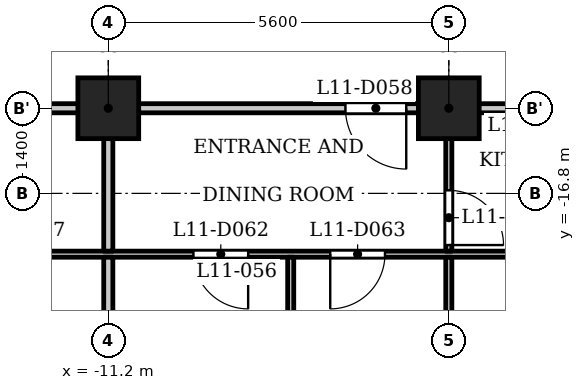
"""IFC4 building model, lengths in metres.
Left out: names, types, materials, properties, quantities, classifications, styles, units other than length and angle.
Written with IfcOpenShell. Run it as: python <this file> out.ifc"""

import sys

from ifc_helpers import new_model, si_unit, direction, frame, frame_2d, origin, origin_2d, place, context, subcontext, project, spatial, rectangle, extrude, element, fill, save


model = new_model("IFC4")
c1 = context("Model", 3, precision=1e-05, world=origin(), true_north=direction((0.0, 1.0)))
c2 = subcontext(c1, "Body", "Model", "MODEL_VIEW")
j1 = project(units=[si_unit("LENGTHUNIT", "METRE"), si_unit("PLANEANGLEUNIT", "RADIAN")], contexts=[c1])
p1 = place(None, origin())
s1 = spatial("IfcSite", under=j1, at=p1, CompositionType="ELEMENT")
p2 = place(p1, origin())
s2 = spatial("IfcBuilding", under=s1, at=p2, CompositionType="ELEMENT")
p3 = place(p2, frame((0.0, 0.0, 48.0)))
s3 = spatial("IfcBuildingStorey", under=s2, at=p3, CompositionType="ELEMENT", Elevation=48.0)
for number, where, z_axis, x_axis in (
    (1, (-11.2, -15.4, 0.0), (0.0, 0.0, 1.0), (1.0, 0.0, 0.0)),
    (2, (-5.6, -15.4, 0.0), (0.0, 0.0, 1.0), (1.0, 0.0, 0.0)),
):
    element("IfcColumn", number, at=place(p3, frame(where, z_axis=z_axis, x_axis=x_axis)), inside=s3, PredefinedType="COLUMN", context=c2, shape_type="SweptSolid", body=[
        extrude(rectangle(XDim=1.0, YDim=1.0, at=origin_2d()), origin(), (0.0, 0.0, 1.0), 3.5),
    ])
p4 = place(p3, frame((-26.394, -17.8, 0.0), z_axis=(0.0, 0.0, 1.0), x_axis=(1.0, 0.0, 0.0)))
e3 = element("IfcWall", 3, at=p4, inside=s3, PredefinedType="PARTITIONING", context=c2, shape_type="SweptSolid", body=[
    extrude(rectangle(XDim=53.126, YDim=0.1, at=frame_2d((26.563, 0.0))), origin(), (0.0, 0.0, 1.0), 3.2),
])
p5 = place(p4, frame((0.794, 0.0, 0.0)))
e4 = element("IfcOpeningElement", 4, at=p5, cuts=e3, PredefinedType="OPENING", context=c2, shape_type="SweptSolid", body=[
    extrude(rectangle(XDim=0.8, YDim=2.1, at=frame_2d((0.4, 1.05))), frame((0.0, 0.06, 0.0), z_axis=(0.0, -1.0, 0.0), x_axis=(1.0, 0.0, 0.0)), (0.0, 0.0, 1.0), 0.12),
])
p6 = place(p4, frame((5.644, 0.0, 0.0)))
e5 = element("IfcOpeningElement", 5, at=p6, cuts=e3, PredefinedType="OPENING", context=c2, shape_type="SweptSolid", body=[
    extrude(rectangle(XDim=0.9, YDim=2.1, at=frame_2d((0.45, 1.05))), frame((0.0, 0.06, 0.0), z_axis=(0.0, -1.0, 0.0), x_axis=(1.0, 0.0, 0.0)), (0.0, 0.0, 1.0), 0.12),
])
p7 = place(p4, frame((10.394, 0.0, 0.0)))
e6 = element("IfcOpeningElement", 6, at=p7, cuts=e3, PredefinedType="OPENING", context=c2, shape_type="SweptSolid", body=[
    extrude(rectangle(XDim=0.8, YDim=2.1, at=frame_2d((0.4, 1.05))), frame((0.0, 0.06, 0.0), z_axis=(0.0, -1.0, 0.0), x_axis=(1.0, 0.0, 0.0)), (0.0, 0.0, 1.0), 0.12),
])
p8 = place(p4, frame((13.244, 0.0, 0.0)))
e7 = element("IfcOpeningElement", 7, at=p8, cuts=e3, PredefinedType="OPENING", context=c2, shape_type="SweptSolid", body=[
    extrude(rectangle(XDim=0.9, YDim=2.1, at=frame_2d((0.45, 1.05))), frame((0.0, 0.06, 0.0), z_axis=(0.0, -1.0, 0.0), x_axis=(1.0, 0.0, 0.0)), (0.0, 0.0, 1.0), 0.12),
])
p9 = place(p4, frame((23.944, 0.0, 0.0)))
e8 = element("IfcOpeningElement", 8, at=p9, cuts=e3, PredefinedType="OPENING", context=c2, shape_type="SweptSolid", body=[
    extrude(rectangle(XDim=0.8, YDim=2.1, at=frame_2d((0.4, 1.05))), frame((0.0, 0.06, 0.0), z_axis=(0.0, -1.0, 0.0), x_axis=(1.0, 0.0, 0.0)), (0.0, 0.0, 1.0), 0.12),
])
p10 = place(p4, frame((22.194, 0.0, 0.0)))
e9 = element("IfcOpeningElement", 9, at=p10, cuts=e3, PredefinedType="OPENING", context=c2, shape_type="SweptSolid", body=[
    extrude(rectangle(XDim=0.9, YDim=2.1, at=frame_2d((0.45, 1.05))), frame((0.0, 0.06, 0.0), z_axis=(0.0, -1.0, 0.0), x_axis=(1.0, 0.0, 0.0)), (0.0, 0.0, 1.0), 0.12),
])
p11 = place(p4, frame((16.594, 0.0, 0.0)))
e10 = element("IfcOpeningElement", 10, at=p11, cuts=e3, PredefinedType="OPENING", context=c2, shape_type="SweptSolid", body=[
    extrude(rectangle(XDim=0.9, YDim=2.1, at=frame_2d((0.45, 1.05))), frame((0.0, 0.06, 0.0), z_axis=(0.0, -1.0, 0.0), x_axis=(1.0, 0.0, 0.0)), (0.0, 0.0, 1.0), 0.12),
])
p12 = place(p4, frame((18.844, 0.0, 0.0)))
e11 = element("IfcOpeningElement", 11, at=p12, cuts=e3, PredefinedType="OPENING", context=c2, shape_type="SweptSolid", body=[
    extrude(rectangle(XDim=0.9, YDim=2.1, at=frame_2d((0.45, 1.05))), frame((0.0, 0.06, 0.0), z_axis=(0.0, -1.0, 0.0), x_axis=(1.0, 0.0, 0.0)), (0.0, 0.0, 1.0), 0.12),
])
p13 = place(p4, frame((30.544, 0.0, 0.0)))
e12 = element("IfcOpeningElement", 12, at=p13, cuts=e3, PredefinedType="OPENING", context=c2, shape_type="SweptSolid", body=[
    extrude(rectangle(XDim=0.8, YDim=2.1, at=frame_2d((0.4, 1.05))), frame((0.0, 0.06, 0.0), z_axis=(0.0, -1.0, 0.0), x_axis=(1.0, 0.0, 0.0)), (0.0, 0.0, 1.0), 0.12),
])
p14 = place(p4, frame((27.294, 0.0, 0.0)))
e13 = element("IfcOpeningElement", 13, at=p14, cuts=e3, PredefinedType="OPENING", context=c2, shape_type="SweptSolid", body=[
    extrude(rectangle(XDim=0.9, YDim=2.1, at=frame_2d((0.45, 1.05))), frame((0.0, 0.06, 0.0), z_axis=(0.0, -1.0, 0.0), x_axis=(1.0, 0.0, 0.0)), (0.0, 0.0, 1.0), 0.12),
])
p15 = place(p4, frame((35.894, 0.0, 0.0)))
e14 = element("IfcOpeningElement", 14, at=p15, cuts=e3, PredefinedType="OPENING", context=c2, shape_type="SweptSolid", body=[
    extrude(rectangle(XDim=0.8, YDim=2.1, at=frame_2d((0.4, 1.05))), frame((0.0, 0.06, 0.0), z_axis=(0.0, -1.0, 0.0), x_axis=(1.0, 0.0, 0.0)), (0.0, 0.0, 1.0), 0.12),
])
p16 = place(p4, frame((33.644, 0.0, 0.0)))
e15 = element("IfcOpeningElement", 15, at=p16, cuts=e3, PredefinedType="OPENING", context=c2, shape_type="SweptSolid", body=[
    extrude(rectangle(XDim=0.9, YDim=2.1, at=frame_2d((0.45, 1.05))), frame((0.0, 0.06, 0.0), z_axis=(0.0, -1.0, 0.0), x_axis=(1.0, 0.0, 0.0)), (0.0, 0.0, 1.0), 0.12),
])
p17 = place(p4, frame((41.494, 0.0, 0.0)))
e16 = element("IfcOpeningElement", 16, at=p17, cuts=e3, PredefinedType="OPENING", context=c2, shape_type="SweptSolid", body=[
    extrude(rectangle(XDim=0.8, YDim=2.1, at=frame_2d((0.4, 1.05))), frame((0.0, 0.06, 0.0), z_axis=(0.0, -1.0, 0.0), x_axis=(1.0, 0.0, 0.0)), (0.0, 0.0, 1.0), 0.12),
])
p18 = place(p4, frame((38.744, 0.0, 0.0)))
e17 = element("IfcOpeningElement", 17, at=p18, cuts=e3, PredefinedType="OPENING", context=c2, shape_type="SweptSolid", body=[
    extrude(rectangle(XDim=0.9, YDim=2.1, at=frame_2d((0.45, 1.05))), frame((0.0, 0.06, 0.0), z_axis=(0.0, -1.0, 0.0), x_axis=(1.0, 0.0, 0.0)), (0.0, 0.0, 1.0), 0.12),
])
p19 = place(p4, frame((49.362, 0.0, 0.0)))
e18 = element("IfcOpeningElement", 18, at=p19, cuts=e3, PredefinedType="OPENING", context=c2, shape_type="SweptSolid", body=[
    extrude(rectangle(XDim=0.8, YDim=2.1, at=frame_2d((0.4, 1.05))), frame((0.0, 0.06, 0.0), z_axis=(0.0, -1.0, 0.0), x_axis=(1.0, 0.0, 0.0)), (0.0, 0.0, 1.0), 0.12),
])
p20 = place(p4, frame((45.094, 0.0, 0.0)))
e19 = element("IfcOpeningElement", 19, at=p20, cuts=e3, PredefinedType="OPENING", context=c2, shape_type="SweptSolid", body=[
    extrude(rectangle(XDim=0.9, YDim=2.1, at=frame_2d((0.45, 1.05))), frame((0.0, 0.06, 0.0), z_axis=(0.0, -1.0, 0.0), x_axis=(1.0, 0.0, 0.0)), (0.0, 0.0, 1.0), 0.12),
])
p21 = place(p3, frame((-27.484, -15.4, 0.0), z_axis=(0.0, 0.0, 1.0), x_axis=(1.0, 0.0, 0.0)))
e20 = element("IfcWall", 20, at=p21, inside=s3, PredefinedType="PARTITIONING", context=c2, shape_type="SweptSolid", body=[
    extrude(rectangle(XDim=54.968, YDim=0.15, at=frame_2d((27.484, 0.0))), origin(), (0.0, 0.0, 1.0), 3.2),
])
p22 = place(p21, frame((5.734, 0.0, 0.0)))
e21 = element("IfcOpeningElement", 21, at=p22, cuts=e20, PredefinedType="OPENING", context=c2, shape_type="SweptSolid", body=[
    extrude(rectangle(XDim=1.0, YDim=2.1, at=frame_2d((0.5, 1.05))), frame((0.0, 0.085, 0.0), z_axis=(0.0, -1.0, 0.0), x_axis=(1.0, 0.0, 0.0)), (0.0, 0.0, 1.0), 0.17),
])
p23 = place(p21, frame((13.334, 0.0, 0.0)))
e22 = element("IfcOpeningElement", 22, at=p23, cuts=e20, PredefinedType="OPENING", context=c2, shape_type="SweptSolid", body=[
    extrude(rectangle(XDim=1.0, YDim=2.1, at=frame_2d((0.5, 1.05))), frame((0.0, 0.085, 0.0), z_axis=(0.0, -1.0, 0.0), x_axis=(1.0, 0.0, 0.0)), (0.0, 0.0, 1.0), 0.17),
])
p24 = place(p21, frame((20.184, 0.0, 0.0)))
e23 = element("IfcOpeningElement", 23, at=p24, cuts=e20, PredefinedType="OPENING", context=c2, shape_type="SweptSolid", body=[
    extrude(rectangle(XDim=1.0, YDim=2.1, at=frame_2d((0.5, 1.05))), frame((0.0, 0.085, 0.0), z_axis=(0.0, -1.0, 0.0), x_axis=(1.0, 0.0, 0.0)), (0.0, 0.0, 1.0), 0.17),
])
p25 = place(p21, frame((29.384, 0.0, 0.0)))
e24 = element("IfcOpeningElement", 24, at=p25, cuts=e20, PredefinedType="OPENING", context=c2, shape_type="SweptSolid", body=[
    extrude(rectangle(XDim=1.0, YDim=2.1, at=frame_2d((0.5, 1.05))), frame((0.0, 0.085, 0.0), z_axis=(0.0, -1.0, 0.0), x_axis=(1.0, 0.0, 0.0)), (0.0, 0.0, 1.0), 0.17),
])
p26 = place(p21, frame((33.734, 0.0, 0.0)))
e25 = element("IfcOpeningElement", 25, at=p26, cuts=e20, PredefinedType="OPENING", context=c2, shape_type="SweptSolid", body=[
    extrude(rectangle(XDim=1.0, YDim=2.1, at=frame_2d((0.5, 1.05))), frame((0.0, 0.085, 0.0), z_axis=(0.0, -1.0, 0.0), x_axis=(1.0, 0.0, 0.0)), (0.0, 0.0, 1.0), 0.17),
])
p27 = place(p21, frame((39.584, 0.0, 0.0)))
e26 = element("IfcOpeningElement", 26, at=p27, cuts=e20, PredefinedType="OPENING", context=c2, shape_type="SweptSolid", body=[
    extrude(rectangle(XDim=1.0, YDim=2.1, at=frame_2d((0.5, 1.05))), frame((0.0, 0.085, 0.0), z_axis=(0.0, -1.0, 0.0), x_axis=(1.0, 0.0, 0.0)), (0.0, 0.0, 1.0), 0.17),
])
p28 = place(p21, frame((45.184, 0.0, 0.0)))
e27 = element("IfcOpeningElement", 27, at=p28, cuts=e20, PredefinedType="OPENING", context=c2, shape_type="SweptSolid", body=[
    extrude(rectangle(XDim=1.0, YDim=2.1, at=frame_2d((0.5, 1.05))), frame((0.0, 0.085, 0.0), z_axis=(0.0, -1.0, 0.0), x_axis=(1.0, 0.0, 0.0)), (0.0, 0.0, 1.0), 0.17),
])
p29 = place(p3, frame((-11.2, -23.13, 0.0), z_axis=(0.0, 0.0, 1.0), x_axis=(0.0, 1.0, 0.0)))
e28 = element("IfcWall", 28, at=p29, inside=s3, PredefinedType="PARTITIONING", context=c2, shape_type="SweptSolid", body=[
    extrude(rectangle(XDim=5.28, YDim=0.15, at=frame_2d((2.64, 0.0))), origin(), (0.0, 0.0, 1.0), 3.2),
])
p30 = place(p3, frame((-11.2, -17.75, 0.0), z_axis=(0.0, 0.0, 1.0), x_axis=(0.0, 1.0, 0.0)))
e29 = element("IfcWall", 29, at=p30, inside=s3, PredefinedType="PARTITIONING", context=c2, shape_type="SweptSolid", body=[
    extrude(rectangle(XDim=2.275, YDim=0.15, at=frame_2d((1.137, 0.0))), origin(), (0.0, 0.0, 1.0), 3.2),
])
p31 = place(p3, frame((-8.2, -22.08, 0.0), z_axis=(0.0, 0.0, 1.0), x_axis=(0.0, 1.0, 0.0)))
e30 = element("IfcWall", 30, at=p31, inside=s3, PredefinedType="PARTITIONING", context=c2, shape_type="SweptSolid", body=[
    extrude(rectangle(XDim=4.23, YDim=0.1, at=frame_2d((2.115, 0.0))), origin(), (0.0, 0.0, 1.0), 3.2),
])
p32 = place(p3, frame((-5.6, -23.13, 0.0), z_axis=(0.0, 0.0, 1.0), x_axis=(0.0, 1.0, 0.0)))
e31 = element("IfcWall", 31, at=p32, inside=s3, PredefinedType="PARTITIONING", context=c2, shape_type="SweptSolid", body=[
    extrude(rectangle(XDim=5.28, YDim=0.1, at=frame_2d((2.64, 0.0))), origin(), (0.0, 0.0, 1.0), 3.2),
])
p33 = place(p3, frame((-5.6, -17.75, 0.0), z_axis=(0.0, 0.0, 1.0), x_axis=(0.0, 1.0, 0.0)))
e32 = element("IfcWall", 32, at=p33, inside=s3, PredefinedType="PARTITIONING", context=c2, shape_type="SweptSolid", body=[
    extrude(rectangle(XDim=2.275, YDim=0.1, at=frame_2d((1.137, 0.0))), origin(), (0.0, 0.0, 1.0), 3.2),
])
p34 = place(p33, frame((0.1, 0.0, 0.0)))
e33 = element("IfcOpeningElement", 33, at=p34, cuts=e32, PredefinedType="OPENING", context=c2, shape_type="SweptSolid", body=[
    extrude(rectangle(XDim=0.9, YDim=2.1, at=frame_2d((0.45, 1.05))), frame((0.0, 0.06, 0.0), z_axis=(0.0, -1.0, 0.0), x_axis=(1.0, 0.0, 0.0)), (0.0, 0.0, 1.0), 0.12),
])
p35 = place(p24, origin())
e34 = element("IfcDoor", 34, at=p35, inside=s3, OperationType="SINGLE_SWING_RIGHT", PredefinedType="DOOR", context=c2, shape_type="SweptSolid", body=[
    extrude(rectangle(XDim=1.0, YDim=2.1, at=frame_2d((0.5, 1.05))), frame((0.0, 0.025, 0.0), z_axis=(0.0, -1.0, 0.0), x_axis=(1.0, 0.0, 0.0)), (0.0, 0.0, 1.0), 0.05),
])
fill(e23, e34)
p36 = place(p34, origin())
e35 = element("IfcDoor", 35, at=p36, inside=s3, OperationType="SINGLE_SWING_LEFT", PredefinedType="DOOR", context=c2, shape_type="SweptSolid", body=[
    extrude(rectangle(XDim=0.9, YDim=2.1, at=frame_2d((0.45, 1.05))), frame((0.0, 0.025, 0.0), z_axis=(0.0, -1.0, 0.0), x_axis=(1.0, 0.0, 0.0)), (0.0, 0.0, 1.0), 0.05),
])
fill(e33, e35)
p37 = place(p11, origin())
e36 = element("IfcDoor", 36, at=p37, inside=s3, OperationType="SINGLE_SWING_RIGHT", PredefinedType="DOOR", context=c2, shape_type="SweptSolid", body=[
    extrude(rectangle(XDim=0.9, YDim=2.1, at=frame_2d((0.45, 1.05))), frame((0.0, 0.025, 0.0), z_axis=(0.0, -1.0, 0.0), x_axis=(1.0, 0.0, 0.0)), (0.0, 0.0, 1.0), 0.05),
])
fill(e10, e36)
p38 = place(p12, origin())
e37 = element("IfcDoor", 37, at=p38, inside=s3, OperationType="SINGLE_SWING_LEFT", PredefinedType="DOOR", context=c2, shape_type="SweptSolid", body=[
    extrude(rectangle(XDim=0.9, YDim=2.1, at=frame_2d((0.45, 1.05))), frame((0.0, 0.025, 0.0), z_axis=(0.0, -1.0, 0.0), x_axis=(1.0, 0.0, 0.0)), (0.0, 0.0, 1.0), 0.05),
])
fill(e11, e37)
save(model, sys.argv[1])
